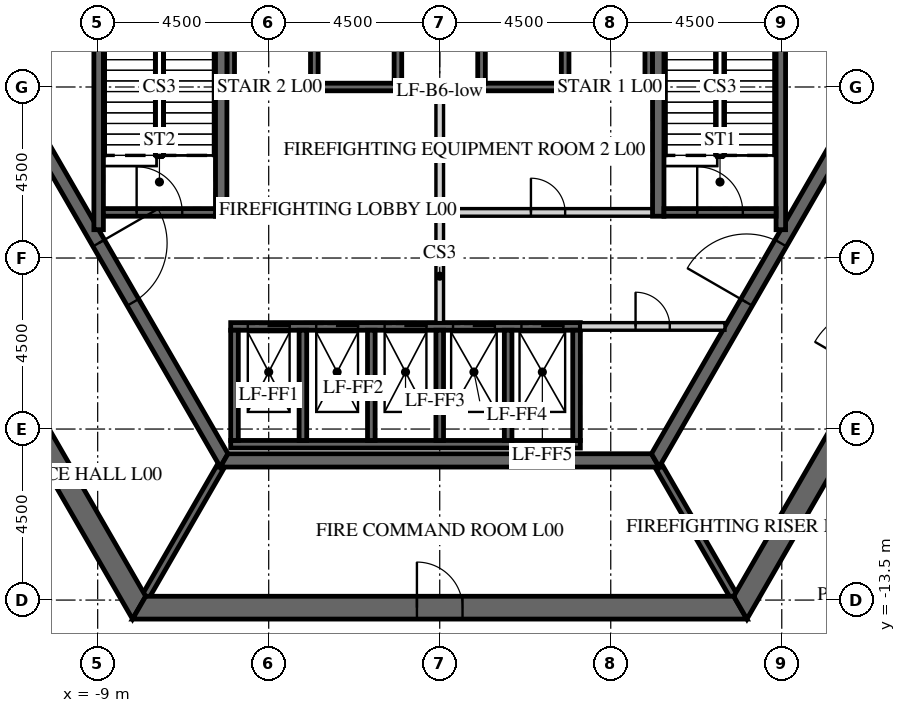
"""IFC4 building model, lengths in metres.
Left out: names, types, materials, properties, quantities, classifications, styles, units other than length and angle.
Written with IfcOpenShell. Run it as: python <this file> out.ifc"""

import sys

from ifc_helpers import new_model, si_unit, direction, frame, frame_2d, origin, place, context, subcontext, project, spatial, polyline, rectangle, outline, extrude, element, fill, save


model = new_model("IFC4")
c1 = context("Model", 3, precision=1e-05, world=origin(), true_north=direction((0.0, 1.0)))
c2 = subcontext(c1, "Body", "Model", "MODEL_VIEW")
j1 = project(units=[si_unit("LENGTHUNIT", "METRE"), si_unit("PLANEANGLEUNIT", "RADIAN")], contexts=[c1])
p1 = place(None, origin())
s1 = spatial("IfcSite", under=j1, at=p1, CompositionType="ELEMENT")
p2 = place(p1, origin())
s2 = spatial("IfcBuilding", under=s1, at=p2, CompositionType="ELEMENT")
p3 = place(p2, origin())
s3 = spatial("IfcBuildingStorey", under=s2, at=p3, CompositionType="ELEMENT", Elevation=0.0)
p4 = place(p3, frame((-7.91, 13.7, -2.1), z_axis=(0.0, 0.0, 1.0), x_axis=(-0.499999880136, -0.866025472988, 0.0)))
e1 = element("IfcWall", 1, at=p4, inside=s3, PredefinedType="SHEAR", context=c2, shape_type="SweptSolid", body=[
    extrude(outline(polyline([(-0.173, -0.3), (15.993, -0.3), (15.646, 0.3), (0.173, 0.3), (-0.173, -0.3)])), origin(), (0.0, 0.0, 1.0), 10.85),
])
p5 = place(p4, frame((7.039, 0.0, 2.1)))
e2 = element("IfcOpeningElement", 2, at=p5, cuts=e1, PredefinedType="OPENING", context=c2, shape_type="SweptSolid", body=[
    extrude(rectangle(XDim=1.8, YDim=2.4, at=frame_2d((0.9, 1.2))), frame((0.0, 0.31, 0.0), z_axis=(0.0, -1.0, 0.0), x_axis=(1.0, 0.0, 0.0)), (0.0, 0.0, 1.0), 0.62),
])
p6 = place(p3, frame((-15.819, 0.0, -2.1), z_axis=(0.0, 0.0, 1.0), x_axis=(0.499999880136, -0.866025472988, 0.0)))
e3 = element("IfcWall", 3, at=p6, inside=s3, PredefinedType="SHEAR", context=c2, shape_type="SweptSolid", body=[
    extrude(outline(polyline([(-0.173, -0.3), (15.993, -0.3), (15.646, 0.3), (0.173, 0.3), (-0.173, -0.3)])), origin(), (0.0, 0.0, 1.0), 10.85),
])
p7 = place(p6, frame((6.981, 0.0, 2.1)))
e4 = element("IfcOpeningElement", 4, at=p7, cuts=e3, PredefinedType="OPENING", context=c2, shape_type="SweptSolid", body=[
    extrude(rectangle(XDim=1.8, YDim=2.4, at=frame_2d((0.9, 1.2))), frame((0.0, 0.31, 0.0), z_axis=(0.0, -1.0, 0.0), x_axis=(1.0, 0.0, 0.0)), (0.0, 0.0, 1.0), 0.62),
])
p8 = place(p3, frame((-7.91, -13.7, -2.1), z_axis=(0.0, 0.0, 1.0), x_axis=(1.0, 0.0, 0.0)))
e5 = element("IfcWall", 5, at=p8, inside=s3, PredefinedType="SHEAR", context=c2, shape_type="SweptSolid", body=[
    extrude(outline(polyline([(-0.173, -0.3), (15.993, -0.3), (15.646, 0.3), (0.173, 0.3), (-0.173, -0.3)])), origin(), (0.0, 0.0, 1.0), 10.85),
])
p9 = place(p8, frame((7.31, 0.0, 2.1)))
e6 = element("IfcOpeningElement", 6, at=p9, cuts=e5, PredefinedType="OPENING", context=c2, shape_type="SweptSolid", body=[
    extrude(rectangle(XDim=1.2, YDim=2.4, at=frame_2d((0.6, 1.2))), frame((0.0, 0.31, 0.0), z_axis=(0.0, -1.0, 0.0), x_axis=(1.0, 0.0, 0.0)), (0.0, 0.0, 1.0), 0.62),
])
p10 = place(p3, frame((7.91, -13.7, -2.1), z_axis=(0.0, 0.0, 1.0), x_axis=(0.499999880136, 0.866025472988, 0.0)))
e7 = element("IfcWall", 7, at=p10, inside=s3, PredefinedType="SHEAR", context=c2, shape_type="SweptSolid", body=[
    extrude(outline(polyline([(-0.173, -0.3), (15.993, -0.3), (15.646, 0.3), (0.173, 0.3), (-0.173, -0.3)])), origin(), (0.0, 0.0, 1.0), 10.85),
])
p11 = place(p10, frame((7.039, 0.0, 2.1)))
e8 = element("IfcOpeningElement", 8, at=p11, cuts=e7, PredefinedType="OPENING", context=c2, shape_type="SweptSolid", body=[
    extrude(rectangle(XDim=1.8, YDim=2.4, at=frame_2d((0.9, 1.2))), frame((0.0, 0.31, 0.0), z_axis=(0.0, -1.0, 0.0), x_axis=(1.0, 0.0, 0.0)), (0.0, 0.0, 1.0), 0.62),
])
p12 = place(p3, frame((15.819, 0.0, -2.1), z_axis=(0.0, 0.0, 1.0), x_axis=(-0.499999880136, 0.866025472988, 0.0)))
e9 = element("IfcWall", 9, at=p12, inside=s3, PredefinedType="SHEAR", context=c2, shape_type="SweptSolid", body=[
    extrude(outline(polyline([(-0.173, -0.3), (15.993, -0.3), (15.646, 0.3), (0.173, 0.3), (-0.173, -0.3)])), origin(), (0.0, 0.0, 1.0), 10.85),
])
p13 = place(p12, frame((6.981, 0.0, 2.1)))
e10 = element("IfcOpeningElement", 10, at=p13, cuts=e9, PredefinedType="OPENING", context=c2, shape_type="SweptSolid", body=[
    extrude(rectangle(XDim=1.8, YDim=2.4, at=frame_2d((0.9, 1.2))), frame((0.0, 0.31, 0.0), z_axis=(0.0, -1.0, 0.0), x_axis=(1.0, 0.0, 0.0)), (0.0, 0.0, 1.0), 0.62),
])
p14 = place(p3, frame((-5.673, 9.825, -2.1), z_axis=(0.0, 0.0, 1.0), x_axis=(-0.499995046907, -0.866028263435, 0.0)))
e11 = element("IfcWall", 11, at=p14, inside=s3, PredefinedType="SHEAR", context=c2, shape_type="SweptSolid", body=[
    extrude(outline(polyline([(-0.101, -0.175), (11.446, -0.175), (11.244, 0.175), (0.101, 0.175), (-0.101, -0.175)])), origin(), (0.0, 0.0, 1.0), 10.85),
])
p15 = place(p14, frame((4.801, 0.0, 2.1)))
e12 = element("IfcOpeningElement", 12, at=p15, cuts=e11, PredefinedType="OPENING", context=c2, shape_type="SweptSolid", body=[
    extrude(rectangle(XDim=1.8, YDim=2.4, at=frame_2d((0.9, 1.2))), frame((0.0, 0.185, 0.0), z_axis=(0.0, -1.0, 0.0), x_axis=(1.0, 0.0, 0.0)), (0.0, 0.0, 1.0), 0.37),
])
p16 = place(p3, frame((-11.345, 0.0, -2.1), z_axis=(0.0, 0.0, 1.0), x_axis=(0.499995046907, -0.866028263435, 0.0)))
e13 = element("IfcWall", 13, at=p16, inside=s3, PredefinedType="SHEAR", context=c2, shape_type="SweptSolid", body=[
    extrude(outline(polyline([(-0.101, -0.175), (11.446, -0.175), (11.244, 0.175), (0.101, 0.175), (-0.101, -0.175)])), origin(), (0.0, 0.0, 1.0), 10.85),
])
p17 = place(p16, frame((4.744, 0.0, 2.1)))
e14 = element("IfcOpeningElement", 14, at=p17, cuts=e13, PredefinedType="OPENING", context=c2, shape_type="SweptSolid", body=[
    extrude(rectangle(XDim=1.8, YDim=2.4, at=frame_2d((0.9, 1.2))), frame((0.0, 0.185, 0.0), z_axis=(0.0, -1.0, 0.0), x_axis=(1.0, 0.0, 0.0)), (0.0, 0.0, 1.0), 0.37),
])
p18 = place(p3, frame((-5.673, -9.825, -2.1), z_axis=(0.0, 0.0, 1.0), x_axis=(1.0, 0.0, 0.0)))
e15 = element("IfcWall", 15, at=p18, inside=s3, PredefinedType="SHEAR", context=c2, shape_type="SweptSolid", body=[
    extrude(outline(polyline([(-0.101, -0.175), (11.446, -0.175), (11.244, 0.175), (0.101, 0.175), (-0.101, -0.175)])), origin(), (0.0, 0.0, 1.0), 10.85),
])
p19 = place(p3, frame((5.673, -9.825, -2.1), z_axis=(0.0, 0.0, 1.0), x_axis=(0.499995046907, 0.866028263435, 0.0)))
e16 = element("IfcWall", 16, at=p19, inside=s3, PredefinedType="SHEAR", context=c2, shape_type="SweptSolid", body=[
    extrude(outline(polyline([(-0.101, -0.175), (11.446, -0.175), (11.244, 0.175), (0.101, 0.175), (-0.101, -0.175)])), origin(), (0.0, 0.0, 1.0), 10.85),
])
p20 = place(p19, frame((4.801, 0.0, 2.1)))
e17 = element("IfcOpeningElement", 17, at=p20, cuts=e16, PredefinedType="OPENING", context=c2, shape_type="SweptSolid", body=[
    extrude(rectangle(XDim=1.8, YDim=2.4, at=frame_2d((0.9, 1.2))), frame((0.0, 0.185, 0.0), z_axis=(0.0, -1.0, 0.0), x_axis=(1.0, 0.0, 0.0)), (0.0, 0.0, 1.0), 0.37),
])
p21 = place(p3, frame((11.345, 0.0, -2.1), z_axis=(0.0, 0.0, 1.0), x_axis=(-0.499995046907, 0.866028263435, 0.0)))
e18 = element("IfcWall", 18, at=p21, inside=s3, PredefinedType="SHEAR", context=c2, shape_type="SweptSolid", body=[
    extrude(outline(polyline([(-0.101, -0.175), (11.446, -0.175), (11.244, 0.175), (0.101, 0.175), (-0.101, -0.175)])), origin(), (0.0, 0.0, 1.0), 10.85),
])
p22 = place(p21, frame((4.744, 0.0, 2.1)))
e19 = element("IfcOpeningElement", 19, at=p22, cuts=e18, PredefinedType="OPENING", context=c2, shape_type="SweptSolid", body=[
    extrude(rectangle(XDim=1.8, YDim=2.4, at=frame_2d((0.9, 1.2))), frame((0.0, 0.185, 0.0), z_axis=(0.0, -1.0, 0.0), x_axis=(1.0, 0.0, 0.0)), (0.0, 0.0, 1.0), 0.37),
])
p23 = place(p3, frame((-5.6, 0.0, -2.1), z_axis=(0.0, 0.0, 1.0), x_axis=(1.0, 0.0, 0.0)))
e20 = element("IfcWall", 20, at=p23, inside=s3, PredefinedType="SHEAR", context=c2, shape_type="SweptSolid", body=[
    extrude(rectangle(XDim=11.2, YDim=0.2, at=frame_2d((5.6, 0.0))), origin(), (0.0, 0.0, 1.0), 10.85),
])
for number, where, z_axis, x_axis in (
    (21, (-5.5, 0.1, -2.1), (0.0, 0.0, 1.0), (0.0, 1.0, 0.0)),
    (22, (-3.3, 0.1, -2.1), (0.0, 0.0, 1.0), (0.0, 1.0, 0.0)),
    (23, (-1.1, 0.1, -2.1), (0.0, 0.0, 1.0), (0.0, 1.0, 0.0)),
    (24, (1.1, 0.1, -2.1), (0.0, 0.0, 1.0), (0.0, 1.0, 0.0)),
    (25, (3.3, 0.1, -2.1), (0.0, 0.0, 1.0), (0.0, 1.0, 0.0)),
    (26, (5.5, 0.1, -2.1), (0.0, 0.0, 1.0), (0.0, 1.0, 0.0)),
):
    element("IfcWall", number, at=place(p3, frame(where, z_axis=z_axis, x_axis=x_axis)), inside=s3, PredefinedType="SHEAR", context=c2, shape_type="SweptSolid", body=[
        extrude(rectangle(XDim=3.1, YDim=0.2, at=frame_2d((1.55, 0.0))), origin(), (0.0, 0.0, 1.0), 10.85),
    ])
p24 = place(p3, frame((-5.5, -6.3, -2.1), z_axis=(0.0, 0.0, 1.0), x_axis=(1.0, 0.0, 0.0)))
e27 = element("IfcWall", 27, at=p24, inside=s3, PredefinedType="SHEAR", context=c2, shape_type="SweptSolid", body=[
    extrude(rectangle(XDim=9.2, YDim=0.2, at=frame_2d((4.6, 0.0))), origin(), (0.0, 0.0, 1.0), 10.85),
])
p25 = place(p24, frame((0.45, 0.0, 2.1)))
e28 = element("IfcOpeningElement", 28, at=p25, cuts=e27, PredefinedType="OPENING", context=c2, shape_type="SweptSolid", body=[
    extrude(rectangle(XDim=1.1, YDim=2.1, at=frame_2d((0.55, 1.05))), frame((0.0, 0.11, 0.0), z_axis=(0.0, -1.0, 0.0), x_axis=(1.0, 0.0, 0.0)), (0.0, 0.0, 1.0), 0.22),
])
p26 = place(p24, frame((2.25, 0.0, 2.1)))
e29 = element("IfcOpeningElement", 29, at=p26, cuts=e27, PredefinedType="OPENING", context=c2, shape_type="SweptSolid", body=[
    extrude(rectangle(XDim=1.1, YDim=2.1, at=frame_2d((0.55, 1.05))), frame((0.0, 0.11, 0.0), z_axis=(0.0, -1.0, 0.0), x_axis=(1.0, 0.0, 0.0)), (0.0, 0.0, 1.0), 0.22),
])
p27 = place(p24, frame((4.05, 0.0, 2.1)))
e30 = element("IfcOpeningElement", 30, at=p27, cuts=e27, PredefinedType="OPENING", context=c2, shape_type="SweptSolid", body=[
    extrude(rectangle(XDim=1.1, YDim=2.1, at=frame_2d((0.55, 1.05))), frame((0.0, 0.11, 0.0), z_axis=(0.0, -1.0, 0.0), x_axis=(1.0, 0.0, 0.0)), (0.0, 0.0, 1.0), 0.22),
])
p28 = place(p24, frame((5.85, 0.0, 2.1)))
e31 = element("IfcOpeningElement", 31, at=p28, cuts=e27, PredefinedType="OPENING", context=c2, shape_type="SweptSolid", body=[
    extrude(rectangle(XDim=1.1, YDim=2.1, at=frame_2d((0.55, 1.05))), frame((0.0, 0.11, 0.0), z_axis=(0.0, -1.0, 0.0), x_axis=(1.0, 0.0, 0.0)), (0.0, 0.0, 1.0), 0.22),
])
p29 = place(p24, frame((7.65, 0.0, 2.1)))
e32 = element("IfcOpeningElement", 32, at=p29, cuts=e27, PredefinedType="OPENING", context=c2, shape_type="SweptSolid", body=[
    extrude(rectangle(XDim=1.1, YDim=2.1, at=frame_2d((0.55, 1.05))), frame((0.0, 0.11, 0.0), z_axis=(0.0, -1.0, 0.0), x_axis=(1.0, 0.0, 0.0)), (0.0, 0.0, 1.0), 0.22),
])
p30 = place(p3, frame((-5.5, -9.4, -2.1), z_axis=(0.0, 0.0, 1.0), x_axis=(1.0, 0.0, 0.0)))
e33 = element("IfcWall", 33, at=p30, inside=s3, PredefinedType="SHEAR", context=c2, shape_type="SweptSolid", body=[
    extrude(rectangle(XDim=9.2, YDim=0.2, at=frame_2d((4.6, 0.0))), origin(), (0.0, 0.0, 1.0), 10.85),
])
for number, where, z_axis, x_axis in (
    (34, (-5.4, -9.3, -2.1), (0.0, 0.0, 1.0), (0.0, 1.0, 0.0)),
    (35, (-3.6, -9.3, -2.1), (0.0, 0.0, 1.0), (0.0, 1.0, 0.0)),
    (36, (-1.8, -9.3, -2.1), (0.0, 0.0, 1.0), (0.0, 1.0, 0.0)),
    (37, (0.0, -9.3, -2.1), (0.0, 0.0, 1.0), (0.0, 1.0, 0.0)),
    (38, (1.8, -9.3, -2.1), (0.0, 0.0, 1.0), (0.0, 1.0, 0.0)),
    (39, (3.6, -9.3, -2.1), (0.0, 0.0, 1.0), (0.0, 1.0, 0.0)),
):
    element("IfcWall", number, at=place(p3, frame(where, z_axis=z_axis, x_axis=x_axis)), inside=s3, PredefinedType="SHEAR", context=c2, shape_type="SweptSolid", body=[
        extrude(rectangle(XDim=2.9, YDim=0.2, at=frame_2d((1.45, 0.0))), origin(), (0.0, 0.0, 1.0), 10.85),
    ])
p31 = place(p3, frame((0.1, -3.3, 0.0), z_axis=(0.0, 0.0, 1.0), x_axis=(1.0, 0.0, 0.0)))
e40 = element("IfcWall", 40, at=p31, inside=s3, PredefinedType="PARTITIONING", context=c2, shape_type="SweptSolid", body=[
    extrude(rectangle(XDim=5.5, YDim=0.2, at=frame_2d((2.75, 0.0))), origin(), (0.0, 0.0, 1.0), 8.75),
])
p32 = place(p31, frame((2.3, 0.0, 0.0)))
e41 = element("IfcOpeningElement", 41, at=p32, cuts=e40, PredefinedType="OPENING", context=c2, shape_type="SweptSolid", body=[
    extrude(rectangle(XDim=0.9, YDim=2.1, at=frame_2d((0.45, 1.05))), frame((0.0, 0.11, 0.0), z_axis=(0.0, -1.0, 0.0), x_axis=(1.0, 0.0, 0.0)), (0.0, 0.0, 1.0), 0.22),
])
p33 = place(p3, frame((0.0, -6.2, 0.0), z_axis=(0.0, 0.0, 1.0), x_axis=(0.0, 1.0, 0.0)))
e42 = element("IfcWall", 42, at=p33, inside=s3, PredefinedType="PARTITIONING", context=c2, shape_type="SweptSolid", body=[
    extrude(rectangle(XDim=6.1, YDim=0.2, at=frame_2d((3.05, 0.0))), origin(), (0.0, 0.0, 1.0), 8.75),
])
p34 = place(p3, frame((3.7, -6.3, 0.0), z_axis=(0.0, 0.0, 1.0), x_axis=(1.0, 0.0, 0.0)))
e43 = element("IfcWall", 43, at=p34, inside=s3, PredefinedType="PARTITIONING", context=c2, shape_type="SweptSolid", body=[
    extrude(rectangle(XDim=3.806, YDim=0.2, at=frame_2d((1.903, 0.0))), origin(), (0.0, 0.0, 1.0), 8.75),
])
p35 = place(p34, frame((1.453, 0.0, 0.0)))
e44 = element("IfcOpeningElement", 44, at=p35, cuts=e43, PredefinedType="OPENING", context=c2, shape_type="SweptSolid", body=[
    extrude(rectangle(XDim=0.9, YDim=2.1, at=frame_2d((0.45, 1.05))), frame((0.0, 0.11, 0.0), z_axis=(0.0, -1.0, 0.0), x_axis=(1.0, 0.0, 0.0)), (0.0, 0.0, 1.0), 0.22),
])
for number, where, z_axis, x_axis in (
    (45, (-5.773, -10.0, -2.1), (0.0, 0.0, 1.0), (-0.5, -0.866, 0.0)),
    (46, (5.773, -10.0, -2.1), (0.0, 0.0, 1.0), (0.5, -0.866, 0.0)),
):
    element("IfcWall", number, at=place(p3, frame(where, z_axis=z_axis, x_axis=x_axis)), inside=s3, PredefinedType="SHEAR", context=c2, shape_type="SweptSolid", body=[
        extrude(rectangle(XDim=3.926, YDim=0.2, at=frame_2d((1.963, 0.0))), origin(), (0.0, 0.0, 1.0), 10.85),
    ])
p36 = place(p3, frame((5.75, -3.4, -2.1), z_axis=(0.0, 0.0, 1.0), x_axis=(0.0, 1.0, 0.0)))
e47 = element("IfcWall", 47, at=p36, inside=s3, PredefinedType="SHEAR", context=c2, shape_type="SweptSolid", body=[
    extrude(rectangle(XDim=6.8, YDim=0.3, at=frame_2d((3.4, 0.0))), origin(), (0.0, 0.0, 1.0), 10.85),
])
p37 = place(p3, frame((8.975, -3.755, -2.1), z_axis=(0.0, 0.0, 1.0), x_axis=(0.0, 1.0, 0.0)))
e48 = element("IfcWall", 48, at=p37, inside=s3, PredefinedType="SHEAR", context=c2, shape_type="SweptSolid", body=[
    extrude(rectangle(XDim=7.51, YDim=0.25, at=frame_2d((3.755, 0.0))), origin(), (0.0, 0.0, 1.0), 10.85),
])
p38 = place(p3, frame((5.9, -3.3, -2.1), z_axis=(0.0, 0.0, 1.0), x_axis=(1.0, 0.0, 0.0)))
e49 = element("IfcWall", 49, at=p38, inside=s3, PredefinedType="SHEAR", context=c2, shape_type="SweptSolid", body=[
    extrude(rectangle(XDim=2.95, YDim=0.2, at=frame_2d((1.475, 0.0))), origin(), (0.0, 0.0, 1.0), 10.85),
])
p39 = place(p38, frame((0.875, 0.0, 2.1)))
e50 = element("IfcOpeningElement", 50, at=p39, cuts=e49, PredefinedType="OPENING", context=c2, shape_type="SweptSolid", body=[
    extrude(rectangle(XDim=1.2, YDim=2.4, at=frame_2d((0.6, 1.2))), frame((0.0, 0.11, 0.0), z_axis=(0.0, -1.0, 0.0), x_axis=(1.0, 0.0, 0.0)), (0.0, 0.0, 1.0), 0.22),
])
p40 = place(p3, frame((-5.75, -3.4, -2.1), z_axis=(0.0, 0.0, 1.0), x_axis=(0.0, 1.0, 0.0)))
e51 = element("IfcWall", 51, at=p40, inside=s3, PredefinedType="SHEAR", context=c2, shape_type="SweptSolid", body=[
    extrude(rectangle(XDim=6.8, YDim=0.3, at=frame_2d((3.4, 0.0))), origin(), (0.0, 0.0, 1.0), 10.85),
])
p41 = place(p3, frame((-8.975, -3.755, -2.1), z_axis=(0.0, 0.0, 1.0), x_axis=(0.0, 1.0, 0.0)))
e52 = element("IfcWall", 52, at=p41, inside=s3, PredefinedType="SHEAR", context=c2, shape_type="SweptSolid", body=[
    extrude(rectangle(XDim=7.51, YDim=0.25, at=frame_2d((3.755, 0.0))), origin(), (0.0, 0.0, 1.0), 10.85),
])
p42 = place(p3, frame((-8.85, -3.3, -2.1), z_axis=(0.0, 0.0, 1.0), x_axis=(1.0, 0.0, 0.0)))
e53 = element("IfcWall", 53, at=p42, inside=s3, PredefinedType="SHEAR", context=c2, shape_type="SweptSolid", body=[
    extrude(rectangle(XDim=2.95, YDim=0.2, at=frame_2d((1.475, 0.0))), origin(), (0.0, 0.0, 1.0), 10.85),
])
p43 = place(p42, frame((0.875, 0.0, 2.1)))
e54 = element("IfcOpeningElement", 54, at=p43, cuts=e53, PredefinedType="OPENING", context=c2, shape_type="SweptSolid", body=[
    extrude(rectangle(XDim=1.2, YDim=2.4, at=frame_2d((0.6, 1.2))), frame((0.0, 0.11, 0.0), z_axis=(0.0, -1.0, 0.0), x_axis=(1.0, 0.0, 0.0)), (0.0, 0.0, 1.0), 0.22),
])
p44 = place(p9, origin())
e55 = element("IfcDoor", 55, at=p44, inside=s3, OperationType="SINGLE_SWING_LEFT", PredefinedType="DOOR", context=c2, shape_type="SweptSolid", body=[
    extrude(rectangle(XDim=1.2, YDim=2.4, at=frame_2d((0.6, 1.2))), frame((0.0, 0.025, 0.0), z_axis=(0.0, -1.0, 0.0), x_axis=(1.0, 0.0, 0.0)), (0.0, 0.0, 1.0), 0.05),
])
fill(e6, e55)
p45 = place(p17, origin())
e56 = element("IfcDoor", 56, at=p45, inside=s3, OperationType="DOUBLE_DOOR_SINGLE_SWING", PredefinedType="DOOR", context=c2, shape_type="SweptSolid", body=[
    extrude(rectangle(XDim=1.8, YDim=2.4, at=frame_2d((0.9, 1.2))), frame((0.0, 0.025, 0.0), z_axis=(0.0, -1.0, 0.0), x_axis=(1.0, 0.0, 0.0)), (0.0, 0.0, 1.0), 0.05),
])
fill(e14, e56)
p46 = place(p20, origin())
e57 = element("IfcDoor", 57, at=p46, inside=s3, OperationType="DOUBLE_DOOR_SINGLE_SWING", PredefinedType="DOOR", context=c2, shape_type="SweptSolid", body=[
    extrude(rectangle(XDim=1.8, YDim=2.4, at=frame_2d((0.9, 1.2))), frame((0.0, 0.025, 0.0), z_axis=(0.0, -1.0, 0.0), x_axis=(1.0, 0.0, 0.0)), (0.0, 0.0, 1.0), 0.05),
])
fill(e17, e57)
p47 = place(p32, origin())
e58 = element("IfcDoor", 58, at=p47, inside=s3, OperationType="SINGLE_SWING_LEFT", PredefinedType="DOOR", context=c2, shape_type="SweptSolid", body=[
    extrude(rectangle(XDim=0.9, YDim=2.1, at=frame_2d((0.45, 1.05))), frame((0.0, 0.025, 0.0), z_axis=(0.0, -1.0, 0.0), x_axis=(1.0, 0.0, 0.0)), (0.0, 0.0, 1.0), 0.05),
])
fill(e41, e58)
p48 = place(p35, origin())
e59 = element("IfcDoor", 59, at=p48, inside=s3, OperationType="SINGLE_SWING_LEFT", PredefinedType="DOOR", context=c2, shape_type="SweptSolid", body=[
    extrude(rectangle(XDim=0.9, YDim=2.1, at=frame_2d((0.45, 1.05))), frame((0.0, 0.025, 0.0), z_axis=(0.0, -1.0, 0.0), x_axis=(1.0, 0.0, 0.0)), (0.0, 0.0, 1.0), 0.05),
])
fill(e44, e59)
p49 = place(p39, origin())
e60 = element("IfcDoor", 60, at=p49, inside=s3, OperationType="SINGLE_SWING_LEFT", PredefinedType="DOOR", context=c2, shape_type="SweptSolid", body=[
    extrude(rectangle(XDim=1.2, YDim=2.4, at=frame_2d((0.6, 1.2))), frame((0.0, 0.025, 0.0), z_axis=(0.0, -1.0, 0.0), x_axis=(1.0, 0.0, 0.0)), (0.0, 0.0, 1.0), 0.05),
])
fill(e50, e60)
p50 = place(p43, origin())
e61 = element("IfcDoor", 61, at=p50, inside=s3, OperationType="SINGLE_SWING_LEFT", PredefinedType="DOOR", context=c2, shape_type="SweptSolid", body=[
    extrude(rectangle(XDim=1.2, YDim=2.4, at=frame_2d((0.6, 1.2))), frame((0.0, 0.025, 0.0), z_axis=(0.0, -1.0, 0.0), x_axis=(1.0, 0.0, 0.0)), (0.0, 0.0, 1.0), 0.05),
])
fill(e54, e61)
p51 = place(p25, origin())
e62 = element("IfcDoor", 62, at=p51, inside=s3, OperationType="SLIDING_TO_LEFT", PredefinedType="DOOR", context=c2, shape_type="SweptSolid", body=[
    extrude(rectangle(XDim=1.1, YDim=2.1, at=frame_2d((0.55, 1.05))), frame((0.0, 0.025, 0.0), z_axis=(0.0, -1.0, 0.0), x_axis=(1.0, 0.0, 0.0)), (0.0, 0.0, 1.0), 0.05),
])
fill(e28, e62)
p52 = place(p26, origin())
e63 = element("IfcDoor", 63, at=p52, inside=s3, OperationType="SLIDING_TO_LEFT", PredefinedType="DOOR", context=c2, shape_type="SweptSolid", body=[
    extrude(rectangle(XDim=1.1, YDim=2.1, at=frame_2d((0.55, 1.05))), frame((0.0, 0.025, 0.0), z_axis=(0.0, -1.0, 0.0), x_axis=(1.0, 0.0, 0.0)), (0.0, 0.0, 1.0), 0.05),
])
fill(e29, e63)
p53 = place(p27, origin())
e64 = element("IfcDoor", 64, at=p53, inside=s3, OperationType="SLIDING_TO_LEFT", PredefinedType="DOOR", context=c2, shape_type="SweptSolid", body=[
    extrude(rectangle(XDim=1.1, YDim=2.1, at=frame_2d((0.55, 1.05))), frame((0.0, 0.025, 0.0), z_axis=(0.0, -1.0, 0.0), x_axis=(1.0, 0.0, 0.0)), (0.0, 0.0, 1.0), 0.05),
])
fill(e30, e64)
p54 = place(p28, origin())
e65 = element("IfcDoor", 65, at=p54, inside=s3, OperationType="SLIDING_TO_LEFT", PredefinedType="DOOR", context=c2, shape_type="SweptSolid", body=[
    extrude(rectangle(XDim=1.1, YDim=2.1, at=frame_2d((0.55, 1.05))), frame((0.0, 0.025, 0.0), z_axis=(0.0, -1.0, 0.0), x_axis=(1.0, 0.0, 0.0)), (0.0, 0.0, 1.0), 0.05),
])
fill(e31, e65)
p55 = place(p29, origin())
e66 = element("IfcDoor", 66, at=p55, inside=s3, OperationType="SLIDING_TO_LEFT", PredefinedType="DOOR", context=c2, shape_type="SweptSolid", body=[
    extrude(rectangle(XDim=1.1, YDim=2.1, at=frame_2d((0.55, 1.05))), frame((0.0, 0.025, 0.0), z_axis=(0.0, -1.0, 0.0), x_axis=(1.0, 0.0, 0.0)), (0.0, 0.0, 1.0), 0.05),
])
fill(e32, e66)
save(model, sys.argv[1])
